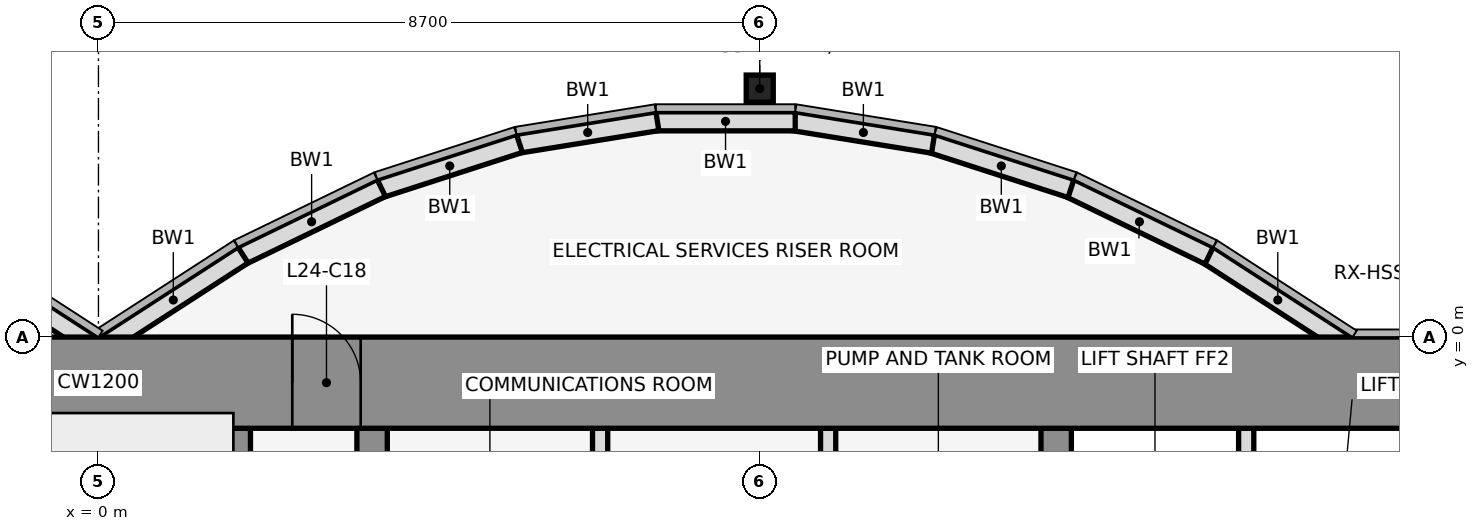
"""IFC4 building model, lengths in metres.
Left out: names, types, materials, properties, quantities, classifications, styles, units other than length and angle.
Written with IfcOpenShell. Run it as: python <this file> out.ifc"""

import sys

from ifc_helpers import new_model, si_unit, direction, frame, frame_2d, origin, origin_2d, place, context, subcontext, project, spatial, rectangle, hollow_rectangle, extrude, element, fill, save


model = new_model("IFC4")
c1 = context("Model", 3, precision=1e-05, world=origin(), true_north=direction((0.0, 1.0)))
c2 = subcontext(c1, "Body", "Model", "MODEL_VIEW")
j1 = project(units=[si_unit("LENGTHUNIT", "METRE"), si_unit("PLANEANGLEUNIT", "RADIAN")], contexts=[c1])
p1 = place(None, origin())
s1 = spatial("IfcSite", under=j1, at=p1, CompositionType="ELEMENT")
p2 = place(p1, origin())
s2 = spatial("IfcBuilding", under=s1, at=p2, CompositionType="ELEMENT")
p3 = place(p2, frame((0.0, 0.0, 114.5)))
s3 = spatial("IfcBuildingStorey", under=s2, at=p3, CompositionType="ELEMENT", Elevation=114.5)
p4 = place(p3, frame((8.7, 3.269, 0.0), z_axis=(0.0, 0.0, 1.0), x_axis=(1.0, 0.0, 0.0)))
e1 = element("IfcColumn", 1, at=p4, inside=s3, PredefinedType="COLUMN", context=c2, shape_type="SweptSolid", body=[
    extrude(hollow_rectangle(XDim=0.356, YDim=0.356, WallThickness=0.012, at=origin_2d()), origin(), (0.0, 0.0, 1.0), 4.1),
])
p5 = place(p3, frame((16.432, -0.105, 0.0), z_axis=(0.0, 0.0, 1.0), x_axis=(-0.83981312244, 0.542875602121, 0.0)))
e2 = element("IfcWall", 2, at=p5, inside=s3, PredefinedType="STANDARD", context=c2, shape_type="SweptSolid", body=[
    extrude(rectangle(XDim=2.183, YDim=0.25, at=frame_2d((1.091, 0.0))), origin(), (0.0, 0.0, 1.0), 3.95),
])
p6 = place(p3, frame((14.612, 1.073, 0.0), z_axis=(0.0, 0.0, 1.0), x_axis=(-0.89982408427, 0.436252928206, 0.0)))
e3 = element("IfcWall", 3, at=p6, inside=s3, PredefinedType="STANDARD", context=c2, shape_type="SweptSolid", body=[
    extrude(rectangle(XDim=2.038, YDim=0.25, at=frame_2d((1.019, 0.0))), origin(), (0.0, 0.0, 1.0), 3.95),
])
p7 = place(p3, frame((12.795, 1.955, 0.0), z_axis=(0.0, 0.0, 1.0), x_axis=(-0.951495806175, 0.307661714928, 0.0)))
e4 = element("IfcWall", 4, at=p7, inside=s3, PredefinedType="STANDARD", context=c2, shape_type="SweptSolid", body=[
    extrude(rectangle(XDim=1.927, YDim=0.25, at=frame_2d((0.963, 0.0))), origin(), (0.0, 0.0, 1.0), 3.95),
])
p8 = place(p3, frame((10.98, 2.543, 0.0), z_axis=(0.0, 0.0, 1.0), x_axis=(-0.987181718931, 0.159600293885, 0.0)))
e5 = element("IfcWall", 5, at=p8, inside=s3, PredefinedType="STANDARD", context=c2, shape_type="SweptSolid", body=[
    extrude(rectangle(XDim=1.857, YDim=0.25, at=frame_2d((0.929, 0.0))), origin(), (0.0, 0.0, 1.0), 3.95),
])
p9 = place(p3, frame((9.167, 2.838, 0.0), z_axis=(0.0, 0.0, 1.0), x_axis=(-1.0, 0.0, 0.0)))
e6 = element("IfcWall", 6, at=p9, inside=s3, PredefinedType="STANDARD", context=c2, shape_type="SweptSolid", body=[
    extrude(rectangle(XDim=1.833, YDim=0.25, at=frame_2d((0.917, 0.0))), origin(), (0.0, 0.0, 1.0), 3.95),
])
p10 = place(p3, frame((7.353, 2.84, 0.0), z_axis=(0.0, 0.0, 1.0), x_axis=(-0.987181718931, -0.159600293885, 0.0)))
e7 = element("IfcWall", 7, at=p10, inside=s3, PredefinedType="STANDARD", context=c2, shape_type="SweptSolid", body=[
    extrude(rectangle(XDim=1.857, YDim=0.25, at=frame_2d((0.929, 0.0))), origin(), (0.0, 0.0, 1.0), 3.95),
])
p11 = place(p3, frame((5.538, 2.548, 0.0), z_axis=(0.0, 0.0, 1.0), x_axis=(-0.951495806175, -0.307661714928, 0.0)))
e8 = element("IfcWall", 8, at=p11, inside=s3, PredefinedType="STANDARD", context=c2, shape_type="SweptSolid", body=[
    extrude(rectangle(XDim=1.927, YDim=0.25, at=frame_2d((0.963, 0.0))), origin(), (0.0, 0.0, 1.0), 3.95),
])
p12 = place(p3, frame((3.721, 1.962, 0.0), z_axis=(0.0, 0.0, 1.0), x_axis=(-0.89982408427, -0.436252928206, 0.0)))
e9 = element("IfcWall", 9, at=p12, inside=s3, PredefinedType="STANDARD", context=c2, shape_type="SweptSolid", body=[
    extrude(rectangle(XDim=2.038, YDim=0.25, at=frame_2d((1.019, 0.0))), origin(), (0.0, 0.0, 1.0), 3.95),
])
for number, where, z_axis, x_axis in (
    (10, (1.901, 1.08, 0.0), (0.0, 0.0, 1.0), (-0.84, -0.543, 0.0)),
    (11, (-0.068, -0.105, 0.0), (0.0, 0.0, 1.0), (-0.84, 0.543, 0.0)),
):
    element("IfcWall", number, at=place(p3, frame(where, z_axis=z_axis, x_axis=x_axis)), inside=s3, PredefinedType="STANDARD", context=c2, shape_type="SweptSolid", body=[
        extrude(rectangle(XDim=2.183, YDim=0.25, at=frame_2d((1.091, 0.0))), origin(), (0.0, 0.0, 1.0), 3.95),
    ])
p13 = place(p3, frame((1.8, -11.8, 0.0), z_axis=(0.0, 0.0, 1.0), x_axis=(0.0, 1.0, 0.0)))
e12 = element("IfcWall", 12, at=p13, inside=s3, PredefinedType="SHEAR", context=c2, shape_type="SweptSolid", body=[
    extrude(rectangle(XDim=10.6, YDim=0.4, at=frame_2d((5.3, 0.0))), origin(), (0.0, 0.0, 1.0), 4.1),
])
p14 = place(p3, frame((3.6, -11.8, 0.0), z_axis=(0.0, 0.0, 1.0), x_axis=(0.0, 1.0, 0.0)))
e13 = element("IfcWall", 13, at=p14, inside=s3, PredefinedType="SHEAR", context=c2, shape_type="SweptSolid", body=[
    extrude(rectangle(XDim=10.6, YDim=0.4, at=frame_2d((5.3, 0.0))), origin(), (0.0, 0.0, 1.0), 4.1),
])
p15 = place(p14, frame((1.35, 0.0, 0.0)))
e14 = element("IfcOpeningElement", 14, at=p15, cuts=e13, PredefinedType="OPENING", context=c2, shape_type="SweptSolid", body=[
    extrude(rectangle(XDim=0.9, YDim=2.1, at=frame_2d((0.45, 1.05))), frame((0.0, 0.212, 0.0), z_axis=(0.0, -1.0, 0.0), x_axis=(1.0, 0.0, 0.0)), (0.0, 0.0, 1.0), 0.424),
])
for number, where, z_axis, x_axis in (
    (15, (6.6, -4.6, 0.0), (0.0, 0.0, 1.0), (0.0, 1.0, 0.0)),
    (16, (9.6, -4.6, 0.0), (0.0, 0.0, 1.0), (0.0, 1.0, 0.0)),
):
    element("IfcWall", number, at=place(p3, frame(where, z_axis=z_axis, x_axis=x_axis)), inside=s3, PredefinedType="PARTITIONING", context=c2, shape_type="SweptSolid", body=[
        extrude(rectangle(XDim=3.4, YDim=0.2, at=frame_2d((1.7, 0.0))), origin(), (0.0, 0.0, 1.0), 3.018),
    ])
p16 = place(p3, frame((12.6, -11.8, 0.0), z_axis=(0.0, 0.0, 1.0), x_axis=(0.0, 1.0, 0.0)))
e17 = element("IfcWall", 17, at=p16, inside=s3, PredefinedType="SHEAR", context=c2, shape_type="SweptSolid", body=[
    extrude(rectangle(XDim=10.6, YDim=0.4, at=frame_2d((5.3, 0.0))), origin(), (0.0, 0.0, 1.0), 4.1),
])
p17 = place(p16, frame((4.75, 0.0, 0.0)))
e18 = element("IfcOpeningElement", 18, at=p17, cuts=e17, PredefinedType="OPENING", context=c2, shape_type="SweptSolid", body=[
    extrude(rectangle(XDim=1.1, YDim=2.1, at=frame_2d((0.55, 1.05))), frame((0.0, 0.212, 0.0), z_axis=(0.0, -1.0, 0.0), x_axis=(1.0, 0.0, 0.0)), (0.0, 0.0, 1.0), 0.424),
])
p18 = place(p3, frame((15.1, -4.6, 0.0), z_axis=(0.0, 0.0, 1.0), x_axis=(0.0, 1.0, 0.0)))
e19 = element("IfcWall", 19, at=p18, inside=s3, PredefinedType="PARTITIONING", context=c2, shape_type="SweptSolid", body=[
    extrude(rectangle(XDim=3.4, YDim=0.2, at=frame_2d((1.7, 0.0))), origin(), (0.0, 0.0, 1.0), 3.018),
])
p19 = place(p3, frame((-22.0, -0.6, 0.0), z_axis=(0.0, 0.0, 1.0), x_axis=(1.0, 0.0, 0.0)))
e20 = element("IfcWall", 20, at=p19, inside=s3, PredefinedType="SHEAR", context=c2, shape_type="SweptSolid", body=[
    extrude(rectangle(XDim=44.0, YDim=1.2, at=frame_2d((22.0, 0.0))), origin(), (0.0, 0.0, 1.0), 4.1),
])
p20 = place(p19, frame((18.55, 0.0, 0.0)))
e21 = element("IfcOpeningElement", 21, at=p20, cuts=e20, PredefinedType="OPENING", context=c2, shape_type="SweptSolid", body=[
    extrude(rectangle(XDim=0.9, YDim=2.1, at=frame_2d((0.45, 1.05))), frame((0.0, 0.612, 0.0), z_axis=(0.0, -1.0, 0.0), x_axis=(1.0, 0.0, 0.0)), (0.0, 0.0, 1.0), 1.224),
])
p21 = place(p19, frame((24.55, 0.0, 0.0)))
e22 = element("IfcOpeningElement", 22, at=p21, cuts=e20, PredefinedType="OPENING", context=c2, shape_type="SweptSolid", body=[
    extrude(rectangle(XDim=0.9, YDim=2.1, at=frame_2d((0.45, 1.05))), frame((0.0, 0.612, 0.0), z_axis=(0.0, -1.0, 0.0), x_axis=(1.0, 0.0, 0.0)), (0.0, 0.0, 1.0), 1.224),
])
p22 = place(p21, origin())
e23 = element("IfcDoor", 23, at=p22, inside=s3, OperationType="SINGLE_SWING_LEFT", PredefinedType="DOOR", context=c2, shape_type="SweptSolid", body=[
    extrude(rectangle(XDim=0.9, YDim=2.1, at=frame_2d((0.45, 1.05))), frame((0.0, 0.025, 0.0), z_axis=(0.0, -1.0, 0.0), x_axis=(1.0, 0.0, 0.0)), (0.0, 0.0, 1.0), 0.05),
])
fill(e22, e23)
save(model, sys.argv[1])
